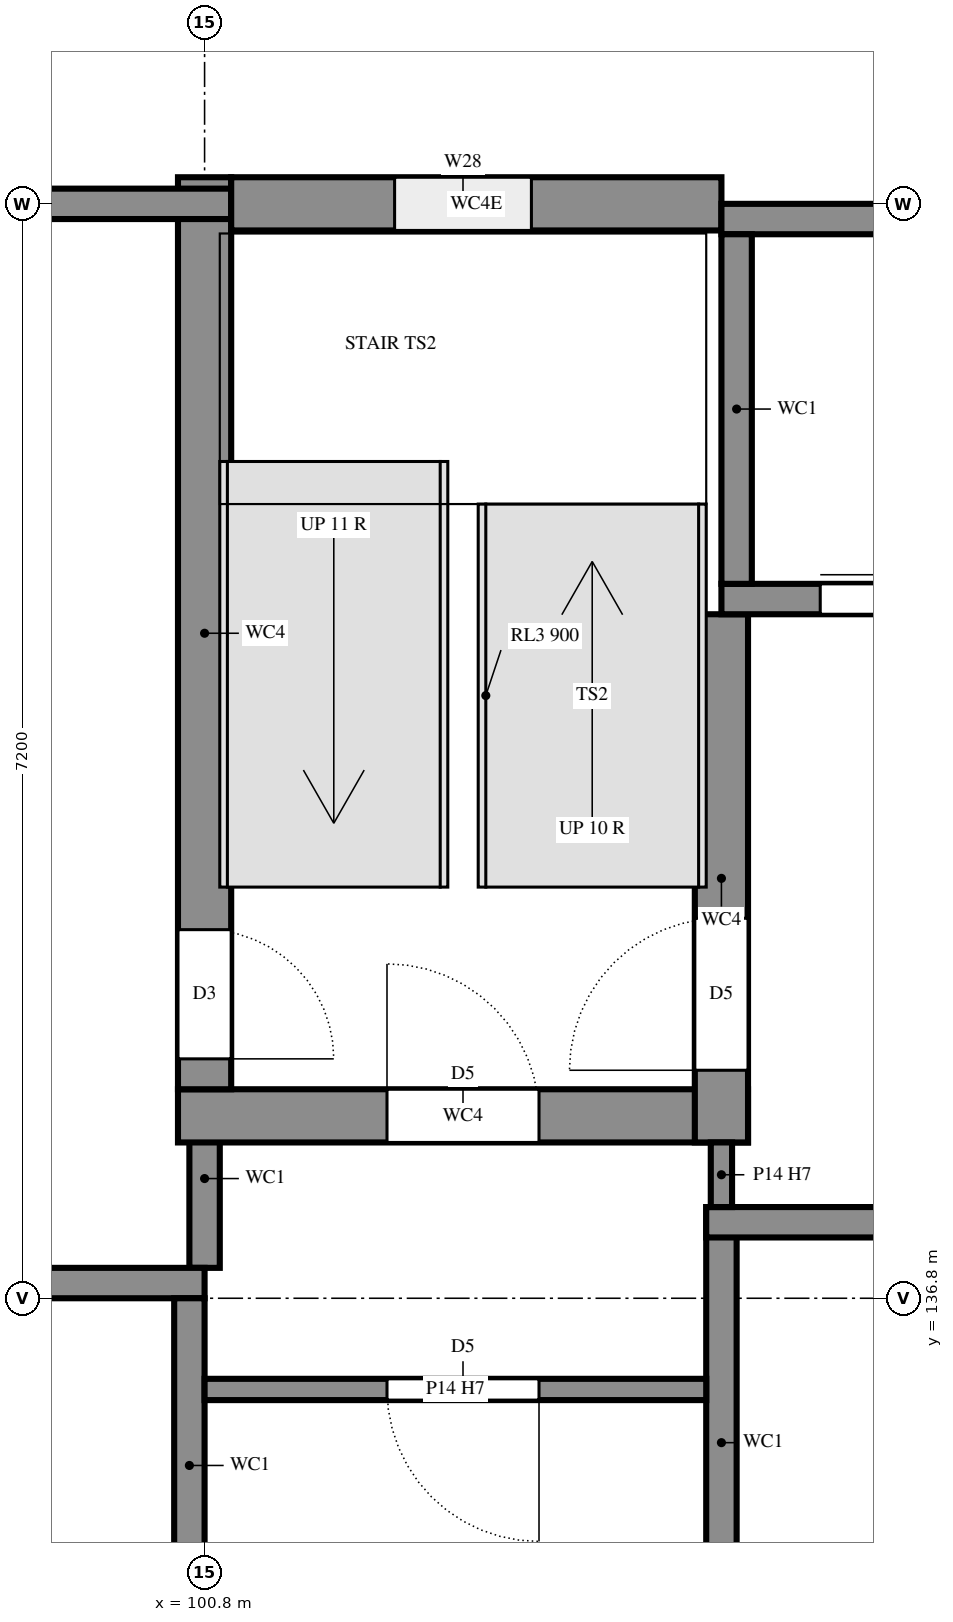
"""IFC4 building model, lengths in metres.
Left out: names, types, materials, properties, quantities, classifications, styles, units other than length and angle.
Written with IfcOpenShell. Run it as: python <this file> out.ifc"""

import sys

from ifc_helpers import new_model, si_unit, direction, frame, frame_2d, origin, place, context, subcontext, project, spatial, rectangle, extrude, element, fill, save


model = new_model("IFC4")
c1 = context("Model", 3, precision=1e-05, world=origin(), true_north=direction((0.0, 1.0)))
c2 = subcontext(c1, "Body", "Model", "MODEL_VIEW")
j1 = project(units=[si_unit("LENGTHUNIT", "METRE"), si_unit("PLANEANGLEUNIT", "RADIAN")], contexts=[c1])
p1 = place(None, origin())
s1 = spatial("IfcSite", under=j1, at=p1, CompositionType="ELEMENT")
p2 = place(p1, origin())
s2 = spatial("IfcBuilding", under=s1, at=p2, CompositionType="ELEMENT")
p3 = place(p2, frame((0.0, 0.0, 18.0)))
s3 = spatial("IfcBuildingStorey", under=s2, at=p3, CompositionType="ELEMENT", Elevation=18.0)
p4 = place(p3, frame((100.8, 137.0, 0.0), z_axis=(0.0, 0.0, 1.0), x_axis=(0.0, 1.0, 0.0)))
e1 = element("IfcWall", 1, at=p4, inside=s3, PredefinedType="SHEAR", context=c2, shape_type="SweptSolid", body=[
    extrude(rectangle(XDim=1.175, YDim=0.2, at=frame_2d((0.587, 0.0))), origin(), (0.0, 0.0, 1.0), 3.6),
])
p5 = place(p3, frame((104.2, 137.4, 0.0), z_axis=(0.0, 0.0, 1.0), x_axis=(0.0, -1.0, 0.0)))
e2 = element("IfcWall", 2, at=p5, inside=s3, PredefinedType="SHEAR", context=c2, shape_type="SweptSolid", body=[
    extrude(rectangle(XDim=3.1, YDim=0.2, at=frame_2d((1.55, 0.0))), origin(), (0.0, 0.0, 1.0), 3.6),
])
p6 = place(p3, frame((108.2, 137.3, 0.0), z_axis=(0.0, 0.0, 1.0), x_axis=(-1.0, 0.0, 0.0)))
e3 = element("IfcWall", 3, at=p6, inside=s3, PredefinedType="SHEAR", context=c2, shape_type="SweptSolid", body=[
    extrude(rectangle(XDim=4.1, YDim=0.2, at=frame_2d((2.05, 0.0))), origin(), (0.0, 0.0, 1.0), 3.6),
])
p7 = place(p3, frame((100.625, 138.0, 0.0), z_axis=(0.0, 0.0, 1.0), x_axis=(1.0, 0.0, 0.0)))
e4 = element("IfcWall", 4, at=p7, inside=s3, PredefinedType="SHEAR", context=c2, shape_type="SweptSolid", body=[
    extrude(rectangle(XDim=3.75, YDim=0.35, at=frame_2d((1.875, 0.0))), origin(), (0.0, 0.0, 1.0), 3.6),
])
p8 = place(p7, frame((1.375, 0.0, 0.0)))
e5 = element("IfcOpeningElement", 5, at=p8, cuts=e4, PredefinedType="OPENING", context=c2, shape_type="SweptSolid", body=[
    extrude(rectangle(XDim=1.0, YDim=2.1, at=frame_2d((0.5, 1.05))), frame((0.0, 0.185, 0.0), z_axis=(0.0, -1.0, 0.0), x_axis=(1.0, 0.0, 0.0)), (0.0, 0.0, 1.0), 0.37),
])
p9 = place(p3, frame((104.2, 137.825, 0.0), z_axis=(0.0, 0.0, 1.0), x_axis=(0.0, 1.0, 0.0)))
e6 = element("IfcWall", 6, at=p9, inside=s3, PredefinedType="SHEAR", context=c2, shape_type="SweptSolid", body=[
    extrude(rectangle(XDim=3.475, YDim=0.35, at=frame_2d((1.738, 0.0))), origin(), (0.0, 0.0, 1.0), 3.6),
])
p10 = place(p9, frame((0.475, 0.0, 0.0)))
e7 = element("IfcOpeningElement", 7, at=p10, cuts=e6, PredefinedType="OPENING", context=c2, shape_type="SweptSolid", body=[
    extrude(rectangle(XDim=1.0, YDim=2.1, at=frame_2d((0.5, 1.05))), frame((0.0, 0.185, 0.0), z_axis=(0.0, -1.0, 0.0), x_axis=(1.0, 0.0, 0.0)), (0.0, 0.0, 1.0), 0.37),
])
p11 = place(p3, frame((100.8, 144.175, 0.0), z_axis=(0.0, 0.0, 1.0), x_axis=(0.0, -1.0, 0.0)))
e8 = element("IfcWall", 8, at=p11, inside=s3, PredefinedType="SHEAR", context=c2, shape_type="SweptSolid", body=[
    extrude(rectangle(XDim=6.0, YDim=0.35, at=frame_2d((3.0, 0.0))), origin(), (0.0, 0.0, 1.0), 3.6),
])
p12 = place(p11, frame((4.95, 0.0, 0.0)))
e9 = element("IfcOpeningElement", 9, at=p12, cuts=e8, PredefinedType="OPENING", context=c2, shape_type="SweptSolid", body=[
    extrude(rectangle(XDim=0.85, YDim=2.1, at=frame_2d((0.425, 1.05))), frame((0.0, 0.185, 0.0), z_axis=(0.0, -1.0, 0.0), x_axis=(1.0, 0.0, 0.0)), (0.0, 0.0, 1.0), 0.37),
])
p13 = place(p3, frame((100.975, 144.0, 0.0), z_axis=(0.0, 0.0, 1.0), x_axis=(-1.0, 0.0, 0.0)))
e10 = element("IfcWall", 10, at=p13, inside=s3, PredefinedType="SHEAR", context=c2, shape_type="SweptSolid", body=[
    extrude(rectangle(XDim=7.575, YDim=0.2, at=frame_2d((3.788, 0.0))), origin(), (0.0, 0.0, 1.0), 3.6),
])
p14 = place(p3, frame((104.2, 144.0, 0.0), z_axis=(0.0, 0.0, 1.0), x_axis=(-1.0, 0.0, 0.0)))
e11 = element("IfcWall", 11, at=p14, inside=s3, PredefinedType="SHEAR", context=c2, shape_type="SweptSolid", body=[
    extrude(rectangle(XDim=3.225, YDim=0.35, at=frame_2d((1.612, 0.0))), origin(), (0.0, 0.0, 1.0), 3.6),
])
p15 = place(p14, frame((1.25, 0.0, 0.6)))
e12 = element("IfcOpeningElement", 12, at=p15, cuts=e11, PredefinedType="OPENING", context=c2, shape_type="SweptSolid", body=[
    extrude(rectangle(XDim=0.9, YDim=2.1, at=frame_2d((0.45, 1.05))), frame((0.0, 0.185, 0.0), z_axis=(0.0, -1.0, 0.0), x_axis=(1.0, 0.0, 0.0)), (0.0, 0.0, 1.0), 0.37),
])
p16 = place(p3, frame((98.4, 136.9, 0.0), z_axis=(0.0, 0.0, 1.0), x_axis=(1.0, 0.0, 0.0)))
e13 = element("IfcWall", 13, at=p16, inside=s3, PredefinedType="SHEAR", context=c2, shape_type="SweptSolid", body=[
    extrude(rectangle(XDim=2.4, YDim=0.2, at=frame_2d((1.2, 0.0))), origin(), (0.0, 0.0, 1.0), 3.6),
])
p17 = place(p3, frame((100.7, 134.6, 0.0), z_axis=(0.0, 0.0, 1.0), x_axis=(0.0, 1.0, 0.0)))
e14 = element("IfcWall", 14, at=p17, inside=s3, PredefinedType="SHEAR", context=c2, shape_type="SweptSolid", body=[
    extrude(rectangle(XDim=2.2, YDim=0.2, at=frame_2d((1.1, 0.0))), origin(), (0.0, 0.0, 1.0), 3.6),
])
p18 = place(p3, frame((104.2, 141.4, 0.0), z_axis=(0.0, 0.0, 1.0), x_axis=(1.0, 0.0, 0.0)))
e15 = element("IfcWall", 15, at=p18, inside=s3, PredefinedType="SHEAR", context=c2, shape_type="SweptSolid", body=[
    extrude(rectangle(XDim=2.4, YDim=0.2, at=frame_2d((1.2, 0.0))), origin(), (0.0, 0.0, 1.0), 3.6),
])
p19 = place(p18, frame((0.65, 0.0, 0.0)))
e16 = element("IfcOpeningElement", 16, at=p19, cuts=e15, PredefinedType="OPENING", context=c2, shape_type="SweptSolid", body=[
    extrude(rectangle(XDim=1.1, YDim=2.1, at=frame_2d((0.55, 1.05))), frame((0.0, 0.11, 0.0), z_axis=(0.0, -1.0, 0.0), x_axis=(1.0, 0.0, 0.0)), (0.0, 0.0, 1.0), 0.22),
])
p20 = place(p3, frame((104.2, 143.9, 0.0), z_axis=(0.0, 0.0, 1.0), x_axis=(1.0, 0.0, 0.0)))
e17 = element("IfcWall", 17, at=p20, inside=s3, PredefinedType="SHEAR", context=c2, shape_type="SweptSolid", body=[
    extrude(rectangle(XDim=2.4, YDim=0.2, at=frame_2d((1.2, 0.0))), origin(), (0.0, 0.0, 1.0), 3.6),
])
p21 = place(p3, frame((104.3, 141.5, 0.0), z_axis=(0.0, 0.0, 1.0), x_axis=(0.0, 1.0, 0.0)))
e18 = element("IfcWall", 18, at=p21, inside=s3, PredefinedType="SHEAR", context=c2, shape_type="SweptSolid", body=[
    extrude(rectangle(XDim=2.3, YDim=0.2, at=frame_2d((1.15, 0.0))), origin(), (0.0, 0.0, 1.0), 3.6),
])
p22 = place(p3, frame((100.8, 136.2, 0.0), z_axis=(0.0, 0.0, 1.0), x_axis=(1.0, 0.0, 0.0)))
e19 = element("IfcWall", 19, at=p22, inside=s3, PredefinedType="PARTITIONING", context=c2, shape_type="SweptSolid", body=[
    extrude(rectangle(XDim=3.3, YDim=0.14, at=frame_2d((1.65, 0.0))), origin(), (0.0, 0.0, 1.0), 3.46),
])
p23 = place(p22, frame((1.2, 0.0, 0.0)))
e20 = element("IfcOpeningElement", 20, at=p23, cuts=e19, PredefinedType="OPENING", context=c2, shape_type="SweptSolid", body=[
    extrude(rectangle(XDim=1.0, YDim=2.1, at=frame_2d((0.5, 1.05))), frame((0.0, 0.08, 0.0), z_axis=(0.0, -1.0, 0.0), x_axis=(1.0, 0.0, 0.0)), (0.0, 0.0, 1.0), 0.16),
])
p24 = place(p3, frame((104.2, 137.4, 0.0), z_axis=(0.0, 0.0, 1.0), x_axis=(0.0, 1.0, 0.0)))
e21 = element("IfcWall", 21, at=p24, inside=s3, PredefinedType="PARTITIONING", context=c2, shape_type="SweptSolid", body=[
    extrude(rectangle(XDim=0.425, YDim=0.14, at=frame_2d((0.212, 0.0))), origin(), (0.0, 0.0, 1.0), 3.46),
])
p25 = place(p15, origin())
e22 = element("IfcWindow", 22, at=p25, inside=s3, PartitioningType="SINGLE_PANEL", PredefinedType="WINDOW", context=c2, shape_type="SweptSolid", body=[
    extrude(rectangle(XDim=0.9, YDim=2.1, at=frame_2d((0.45, 1.05))), frame((0.0, 0.03, 0.0), z_axis=(0.0, -1.0, 0.0), x_axis=(1.0, 0.0, 0.0)), (0.0, 0.0, 1.0), 0.06),
])
fill(e12, e22)
p26 = place(p19, origin())
e23 = element("IfcDoor", 23, at=p26, inside=s3, OperationType="SLIDING_TO_LEFT", PredefinedType="DOOR", context=c2, shape_type="SweptSolid", body=[
    extrude(rectangle(XDim=1.1, YDim=2.1, at=frame_2d((0.55, 1.05))), frame((0.0, 0.025, 0.0), z_axis=(0.0, -1.0, 0.0), x_axis=(1.0, 0.0, 0.0)), (0.0, 0.0, 1.0), 0.05),
])
fill(e16, e23)
p27 = place(p23, frame((1.0, 0.0, 0.0), z_axis=(0.0, 0.0, 1.0), x_axis=(-1.0, 0.0, 0.0)))
e24 = element("IfcDoor", 24, at=p27, inside=s3, OperationType="SINGLE_SWING_RIGHT", PredefinedType="DOOR", context=c2, shape_type="SweptSolid", body=[
    extrude(rectangle(XDim=1.0, YDim=2.1, at=frame_2d((0.5, 1.05))), frame((0.0, 0.025, 0.0), z_axis=(0.0, -1.0, 0.0), x_axis=(1.0, 0.0, 0.0)), (0.0, 0.0, 1.0), 0.05),
])
fill(e20, e24)
p28 = place(p8, origin())
e25 = element("IfcDoor", 25, at=p28, inside=s3, OperationType="SINGLE_SWING_RIGHT", PredefinedType="DOOR", context=c2, shape_type="SweptSolid", body=[
    extrude(rectangle(XDim=1.0, YDim=2.1, at=frame_2d((0.5, 1.05))), frame((0.0, 0.025, 0.0), z_axis=(0.0, -1.0, 0.0), x_axis=(1.0, 0.0, 0.0)), (0.0, 0.0, 1.0), 0.05),
])
fill(e5, e25)
p29 = place(p12, origin())
e26 = element("IfcDoor", 26, at=p29, inside=s3, OperationType="SINGLE_SWING_LEFT", PredefinedType="DOOR", context=c2, shape_type="SweptSolid", body=[
    extrude(rectangle(XDim=0.85, YDim=2.1, at=frame_2d((0.425, 1.05))), frame((0.0, 0.025, 0.0), z_axis=(0.0, -1.0, 0.0), x_axis=(1.0, 0.0, 0.0)), (0.0, 0.0, 1.0), 0.05),
])
fill(e9, e26)
p30 = place(p10, origin())
e27 = element("IfcDoor", 27, at=p30, inside=s3, OperationType="SINGLE_SWING_RIGHT", PredefinedType="DOOR", context=c2, shape_type="SweptSolid", body=[
    extrude(rectangle(XDim=1.0, YDim=2.1, at=frame_2d((0.5, 1.05))), frame((0.0, 0.025, 0.0), z_axis=(0.0, -1.0, 0.0), x_axis=(1.0, 0.0, 0.0)), (0.0, 0.0, 1.0), 0.05),
])
fill(e7, e27)
save(model, sys.argv[1])
